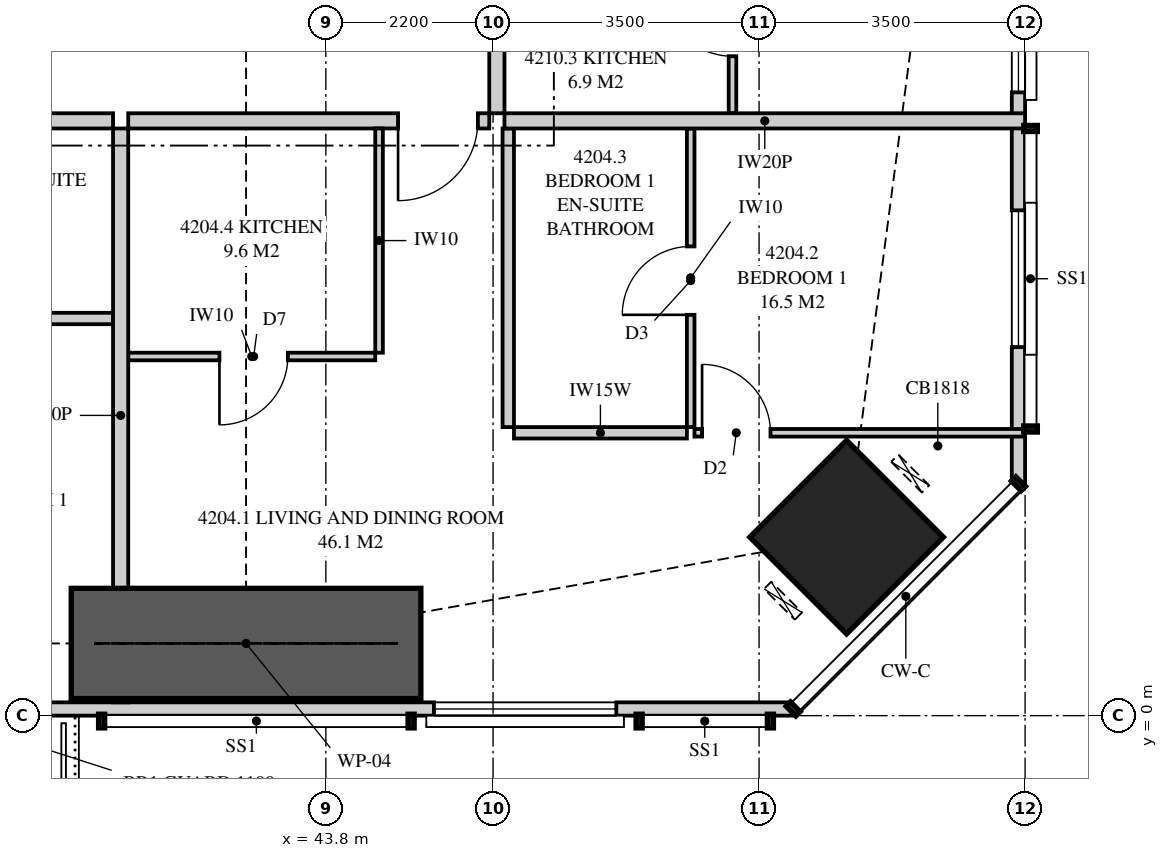
"""IFC4 building model, lengths in metres.
Left out: names, types, materials, properties, quantities, classifications, styles, units other than length and angle.
Written with IfcOpenShell. Run it as: python <this file> out.ifc"""

import sys

from ifc_helpers import new_model, si_unit, direction, frame, frame_2d, origin, origin_2d, place, context, subcontext, project, spatial, polyline, rectangle, hollow_rectangle, outline, extrude, element, fill, save


model = new_model("IFC4")
c1 = context("Model", 3, precision=1e-05, world=origin(), true_north=direction((0.0, 1.0)))
c2 = subcontext(c1, "Body", "Model", "MODEL_VIEW")
j1 = project(units=[si_unit("LENGTHUNIT", "METRE"), si_unit("PLANEANGLEUNIT", "RADIAN")], contexts=[c1])
p1 = place(None, origin())
s1 = spatial("IfcSite", under=j1, at=p1, CompositionType="ELEMENT")
p2 = place(p1, origin())
s2 = spatial("IfcBuilding", under=s1, at=p2, CompositionType="ELEMENT")
p3 = place(p2, frame((0.0, 0.0, 157.7)))
s3 = spatial("IfcBuildingStorey", under=s2, at=p3, CompositionType="ELEMENT", Elevation=157.7)
p4 = place(p3, frame((50.652, 2.348, 0.0), z_axis=(0.0, 0.0, 1.0), x_axis=(-0.707106781187, 0.707106781187, 0.0)))
e1 = element("IfcColumn", 1, at=p4, inside=s3, PredefinedType="COLUMN", context=c2, shape_type="SweptSolid", body=[
    extrude(hollow_rectangle(XDim=1.8, YDim=1.8, WallThickness=0.125, at=origin_2d()), origin(), (0.0, 0.0, 1.0), 3.35),
])
p5 = place(p3, frame((15.051, 0.087, 0.0), z_axis=(0.0, 0.0, 1.0), x_axis=(1.0, 0.0, 0.0)))
e2 = element("IfcWall", 2, at=p5, inside=s3, PredefinedType="SOLIDWALL", context=c2, shape_type="SweptSolid", body=[
    extrude(outline(polyline([(0.0, 0.0), (34.897, 0.0), (34.897, 3.11), (27.91, 3.11), (27.91, 2.15), (27.836, 2.15), (27.836, 3.11), (27.699, 3.11), (27.699, 2.15), (7.199, 2.15), (7.199, 3.11), (7.062, 3.11), (7.062, 2.15), (6.987, 2.15), (6.987, 3.11), (0.0, 3.11), (0.0, 0.0)])), frame((0.0, 0.087, 0.0), z_axis=(0.0, -1.0, 0.0), x_axis=(1.0, 0.0, 0.0)), (0.0, 0.0, 1.0), 0.175),
])
p6 = place(p5, frame((1.625, 0.0, 0.4)))
e3 = element("IfcOpeningElement", 3, at=p6, cuts=e2, PredefinedType="OPENING", context=c2, shape_type="SweptSolid", body=[
    extrude(rectangle(XDim=2.4, YDim=1.7, at=frame_2d((1.2, 0.85))), frame((0.0, 0.097, 0.0), z_axis=(0.0, -1.0, 0.0), x_axis=(1.0, 0.0, 0.0)), (0.0, 0.0, 1.0), 0.195),
])
p7 = place(p5, frame((10.399, 0.0, 0.0)))
e4 = element("IfcOpeningElement", 4, at=p7, cuts=e2, PredefinedType="OPENING", context=c2, shape_type="SweptSolid", body=[
    extrude(rectangle(XDim=1.8, YDim=2.1, at=frame_2d((0.9, 1.05))), frame((0.0, 0.097, 0.0), z_axis=(0.0, -1.0, 0.0), x_axis=(1.0, 0.0, 0.0)), (0.0, 0.0, 1.0), 0.195),
])
p8 = place(p5, frame((13.224, 0.0, 0.4)))
e5 = element("IfcOpeningElement", 5, at=p8, cuts=e2, PredefinedType="OPENING", context=c2, shape_type="SweptSolid", body=[
    extrude(rectangle(XDim=1.8, YDim=1.7, at=frame_2d((0.9, 0.85))), frame((0.0, 0.097, 0.0), z_axis=(0.0, -1.0, 0.0), x_axis=(1.0, 0.0, 0.0)), (0.0, 0.0, 1.0), 0.195),
])
p9 = place(p5, frame((19.849, 0.0, 0.4)))
e6 = element("IfcOpeningElement", 6, at=p9, cuts=e2, PredefinedType="OPENING", context=c2, shape_type="SweptSolid", body=[
    extrude(rectangle(XDim=2.4, YDim=1.7, at=frame_2d((1.2, 0.85))), frame((0.0, 0.097, 0.0), z_axis=(0.0, -1.0, 0.0), x_axis=(1.0, 0.0, 0.0)), (0.0, 0.0, 1.0), 0.195),
])
p10 = place(p5, frame((22.799, 0.0, 0.0)))
e7 = element("IfcOpeningElement", 7, at=p10, cuts=e2, PredefinedType="OPENING", context=c2, shape_type="SweptSolid", body=[
    extrude(rectangle(XDim=1.8, YDim=2.1, at=frame_2d((0.9, 1.05))), frame((0.0, 0.097, 0.0), z_axis=(0.0, -1.0, 0.0), x_axis=(1.0, 0.0, 0.0)), (0.0, 0.0, 1.0), 0.195),
])
p11 = place(p5, frame((30.17, 0.0, 0.4)))
e8 = element("IfcOpeningElement", 8, at=p11, cuts=e2, PredefinedType="OPENING", context=c2, shape_type="SweptSolid", body=[
    extrude(rectangle(XDim=2.4, YDim=1.7, at=frame_2d((1.2, 0.85))), frame((0.0, 0.097, 0.0), z_axis=(0.0, -1.0, 0.0), x_axis=(1.0, 0.0, 0.0)), (0.0, 0.0, 1.0), 0.195),
])
p12 = place(p3, frame((52.913, 3.051, 0.0), z_axis=(0.0, 0.0, 1.0), x_axis=(0.0, 1.0, 0.0)))
e9 = element("IfcWall", 9, at=p12, inside=s3, PredefinedType="SOLIDWALL", context=c2, shape_type="SweptSolid", body=[
    extrude(outline(polyline([(0.0, 0.0), (29.897, 0.0), (29.897, 3.11), (22.167, 3.11), (22.167, 2.15), (22.074, 2.15), (22.074, 3.11), (21.949, 3.11), (21.949, 2.15), (9.949, 2.15), (9.949, 3.11), (9.847, 3.11), (9.847, 2.15), (9.706, 2.15), (9.706, 3.11), (0.0, 3.11), (0.0, 0.0)])), frame((0.0, 0.087, 0.0), z_axis=(0.0, -1.0, 0.0), x_axis=(1.0, 0.0, 0.0)), (0.0, 0.0, 1.0), 0.175),
])
p13 = place(p12, frame((1.797, 0.0, 0.4)))
e10 = element("IfcOpeningElement", 10, at=p13, cuts=e9, PredefinedType="OPENING", context=c2, shape_type="SweptSolid", body=[
    extrude(rectangle(XDim=1.8, YDim=1.7, at=frame_2d((0.9, 0.85))), frame((0.0, 0.097, 0.0), z_axis=(0.0, -1.0, 0.0), x_axis=(1.0, 0.0, 0.0)), (0.0, 0.0, 1.0), 0.195),
])
p14 = place(p12, frame((5.149, 0.0, 0.4)))
e11 = element("IfcOpeningElement", 11, at=p14, cuts=e9, PredefinedType="OPENING", context=c2, shape_type="SweptSolid", body=[
    extrude(rectangle(XDim=2.4, YDim=1.7, at=frame_2d((1.2, 0.85))), frame((0.0, 0.097, 0.0), z_axis=(0.0, -1.0, 0.0), x_axis=(1.0, 0.0, 0.0)), (0.0, 0.0, 1.0), 0.195),
])
p15 = place(p12, frame((15.274, 0.0, 0.0)))
e12 = element("IfcOpeningElement", 12, at=p15, cuts=e9, PredefinedType="OPENING", context=c2, shape_type="SweptSolid", body=[
    extrude(rectangle(XDim=1.8, YDim=2.1, at=frame_2d((0.9, 1.05))), frame((0.0, 0.097, 0.0), z_axis=(0.0, -1.0, 0.0), x_axis=(1.0, 0.0, 0.0)), (0.0, 0.0, 1.0), 0.195),
])
p16 = place(p12, frame((12.349, 0.0, 0.4)))
e13 = element("IfcOpeningElement", 13, at=p16, cuts=e9, PredefinedType="OPENING", context=c2, shape_type="SweptSolid", body=[
    extrude(rectangle(XDim=2.4, YDim=1.7, at=frame_2d((1.2, 0.85))), frame((0.0, 0.097, 0.0), z_axis=(0.0, -1.0, 0.0), x_axis=(1.0, 0.0, 0.0)), (0.0, 0.0, 1.0), 0.195),
])
p17 = place(p12, frame((24.373, 0.0, 0.4)))
e14 = element("IfcOpeningElement", 14, at=p17, cuts=e9, PredefinedType="OPENING", context=c2, shape_type="SweptSolid", body=[
    extrude(rectangle(XDim=1.2, YDim=1.7, at=frame_2d((0.6, 0.85))), frame((0.0, 0.097, 0.0), z_axis=(0.0, -1.0, 0.0), x_axis=(1.0, 0.0, 0.0)), (0.0, 0.0, 1.0), 0.195),
])
p18 = place(p12, frame((26.801, 0.0, 0.4)))
e15 = element("IfcOpeningElement", 15, at=p18, cuts=e9, PredefinedType="OPENING", context=c2, shape_type="SweptSolid", body=[
    extrude(rectangle(XDim=1.8, YDim=1.7, at=frame_2d((0.9, 0.85))), frame((0.0, 0.097, 0.0), z_axis=(0.0, -1.0, 0.0), x_axis=(1.0, 0.0, 0.0)), (0.0, 0.0, 1.0), 0.195),
])
p19 = place(p3, frame((41.1, 0.175, 0.0), z_axis=(0.0, 0.0, 1.0), x_axis=(0.0, 1.0, 0.0)))
e16 = element("IfcWall", 16, at=p19, inside=s3, PredefinedType="PARTITIONING", context=c2, shape_type="SweptSolid", body=[
    extrude(outline(polyline([(0.529, 2.15), (0.0, 2.15), (0.0, 0.0), (0.529, 0.0), (0.529, 0.165), (1.021, 0.165), (1.021, 0.0), (7.55, 0.0), (7.55, 3.11), (1.685, 3.11), (1.685, 2.15), (1.021, 2.15), (1.021, 1.985), (0.529, 1.985), (0.529, 2.15)])), frame((0.0, 0.1, 0.0), z_axis=(0.0, -1.0, 0.0), x_axis=(1.0, 0.0, 0.0)), (0.0, 0.0, 1.0), 0.2),
])
p20 = place(p3, frame((37.55, 5.225, 0.0), z_axis=(0.0, 0.0, 1.0), x_axis=(1.0, 0.0, 0.0)))
e17 = element("IfcWall", 17, at=p20, inside=s3, PredefinedType="PLUMBINGWALL", context=c2, shape_type="SweptSolid", body=[
    extrude(rectangle(XDim=3.45, YDim=0.15, at=frame_2d((1.725, 0.0))), origin(), (0.0, 0.0, 1.0), 3.11),
])
p21 = place(p20, frame((0.4, 0.0, 0.0)))
e18 = element("IfcOpeningElement", 18, at=p21, cuts=e17, PredefinedType="OPENING", context=c2, shape_type="SweptSolid", body=[
    extrude(rectangle(XDim=0.9, YDim=2.1, at=frame_2d((0.45, 1.05))), frame((0.0, 0.085, 0.0), z_axis=(0.0, -1.0, 0.0), x_axis=(1.0, 0.0, 0.0)), (0.0, 0.0, 1.0), 0.17),
])
p22 = place(p3, frame((41.2, 7.825, 0.0), z_axis=(0.0, 0.0, 1.0), x_axis=(1.0, 0.0, 0.0)))
e19 = element("IfcWall", 19, at=p22, inside=s3, PredefinedType="PARTITIONING", context=c2, shape_type="SweptSolid", body=[
    extrude(outline(polyline([(0.0, 0.0), (4.75, 0.0), (4.75, 3.11), (1.896, 3.11), (1.896, 2.531), (1.204, 2.531), (1.204, 3.11), (0.0, 3.11), (0.0, 0.0)])), frame((0.0, 0.1, 0.0), z_axis=(0.0, -1.0, 0.0), x_axis=(1.0, 0.0, 0.0)), (0.0, 0.0, 1.0), 0.2),
])
p23 = place(p22, frame((3.55, 0.0, 0.0)))
e20 = element("IfcOpeningElement", 20, at=p23, cuts=e19, PredefinedType="OPENING", context=c2, shape_type="SweptSolid", body=[
    extrude(rectangle(XDim=1.05, YDim=2.2, at=frame_2d((0.525, 1.1))), frame((0.0, 0.11, 0.0), z_axis=(0.0, -1.0, 0.0), x_axis=(1.0, 0.0, 0.0)), (0.0, 0.0, 1.0), 0.22),
])
p24 = place(p3, frame((48.6, 3.796, 0.0), z_axis=(0.0, 0.0, 1.0), x_axis=(0.0, 1.0, 0.0)))
e21 = element("IfcWall", 21, at=p24, inside=s3, PredefinedType="PARTITIONING", context=c2, shape_type="SweptSolid", body=[
    extrude(rectangle(XDim=3.929, YDim=0.1, at=frame_2d((1.964, 0.0))), origin(), (0.0, 0.0, 1.0), 3.11),
])
p25 = place(p24, frame((1.477, 0.0, 0.0)))
e22 = element("IfcOpeningElement", 22, at=p25, cuts=e21, PredefinedType="OPENING", context=c2, shape_type="SweptSolid", body=[
    extrude(rectangle(XDim=0.9, YDim=2.1, at=frame_2d((0.45, 1.05))), frame((0.0, 0.06, 0.0), z_axis=(0.0, -1.0, 0.0), x_axis=(1.0, 0.0, 0.0)), (0.0, 0.0, 1.0), 0.12),
])
p26 = place(p3, frame((48.65, 3.721, 0.0), z_axis=(0.0, 0.0, 1.0), x_axis=(1.0, 0.0, 0.0)))
e23 = element("IfcWall", 23, at=p26, inside=s3, PredefinedType="PARTITIONING", context=c2, shape_type="SweptSolid", body=[
    extrude(outline(polyline([(0.0, 0.0), (4.35, 0.0), (4.35, 3.11), (3.049, 3.11), (3.049, 2.15), (1.314, 2.15), (1.314, 3.11), (0.0, 3.11), (0.0, 0.0)])), frame((0.0, 0.05, 0.0), z_axis=(0.0, -1.0, 0.0), x_axis=(1.0, 0.0, 0.0)), (0.0, 0.0, 1.0), 0.1),
])
p27 = place(p26, frame((0.1, 0.0, 0.0)))
e24 = element("IfcOpeningElement", 24, at=p27, cuts=e23, PredefinedType="OPENING", context=c2, shape_type="SweptSolid", body=[
    extrude(rectangle(XDim=0.9, YDim=2.1, at=frame_2d((0.45, 1.05))), frame((0.0, 0.06, 0.0), z_axis=(0.0, -1.0, 0.0), x_axis=(1.0, 0.0, 0.0)), (0.0, 0.0, 1.0), 0.12),
])
p28 = place(p3, frame((46.275, 3.721, 0.0), z_axis=(0.0, 0.0, 1.0), x_axis=(1.0, 0.0, 0.0)))
e25 = element("IfcWall", 25, at=p28, inside=s3, PredefinedType="PLUMBINGWALL", context=c2, shape_type="SweptSolid", body=[
    extrude(rectangle(XDim=2.275, YDim=0.15, at=frame_2d((1.138, 0.0))), origin(), (0.0, 0.0, 1.0), 3.11),
])
p29 = place(p3, frame((46.2, 3.796, 0.0), z_axis=(0.0, 0.0, 1.0), x_axis=(0.0, 1.0, 0.0)))
e26 = element("IfcWall", 26, at=p29, inside=s3, PredefinedType="PLUMBINGWALL", context=c2, shape_type="SweptSolid", body=[
    extrude(rectangle(XDim=3.929, YDim=0.15, at=frame_2d((1.964, 0.0))), origin(), (0.0, 0.0, 1.0), 3.11),
])
p30 = place(p3, frame((41.2, 4.725, 0.0), z_axis=(0.0, 0.0, 1.0), x_axis=(1.0, 0.0, 0.0)))
e27 = element("IfcWall", 27, at=p30, inside=s3, PredefinedType="PARTITIONING", context=c2, shape_type="SweptSolid", body=[
    extrude(outline(polyline([(0.0, 0.0), (3.25, 0.0), (3.25, 3.11), (1.846, 3.11), (1.846, 2.531), (1.254, 2.531), (1.254, 3.11), (0.0, 3.11), (0.0, 0.0)])), frame((0.0, 0.05, 0.0), z_axis=(0.0, -1.0, 0.0), x_axis=(1.0, 0.0, 0.0)), (0.0, 0.0, 1.0), 0.1),
])
p31 = place(p30, frame((1.2, 0.0, 0.0)))
e28 = element("IfcOpeningElement", 28, at=p31, cuts=e27, PredefinedType="OPENING", context=c2, shape_type="SweptSolid", body=[
    extrude(rectangle(XDim=0.9, YDim=2.1, at=frame_2d((0.45, 1.05))), frame((0.0, 0.06, 0.0), z_axis=(0.0, -1.0, 0.0), x_axis=(1.0, 0.0, 0.0)), (0.0, 0.0, 1.0), 0.12),
])
p32 = place(p3, frame((44.5, 4.775, 0.0), z_axis=(0.0, 0.0, 1.0), x_axis=(0.0, 1.0, 0.0)))
e29 = element("IfcWall", 29, at=p32, inside=s3, PredefinedType="PARTITIONING", context=c2, shape_type="SweptSolid", body=[
    extrude(rectangle(XDim=2.95, YDim=0.1, at=frame_2d((1.475, 0.0))), origin(), (0.0, 0.0, 1.0), 3.11),
])
p33 = place(p3, frame((46.15, 7.825, 0.0), z_axis=(0.0, 0.0, 1.0), x_axis=(1.0, 0.0, 0.0)))
e30 = element("IfcWall", 30, at=p33, inside=s3, PredefinedType="PARTITIONING", context=c2, shape_type="SweptSolid", body=[
    extrude(outline(polyline([(0.0, 0.0), (6.85, 0.0), (6.85, 3.11), (6.138, 3.11), (6.138, 2.15), (4.303, 2.15), (4.303, 3.11), (0.0, 3.11), (0.0, 0.0)])), frame((0.0, 0.1, 0.0), z_axis=(0.0, -1.0, 0.0), x_axis=(1.0, 0.0, 0.0)), (0.0, 0.0, 1.0), 0.2),
])
p34 = place(p3, frame((46.05, 7.925, 0.0), z_axis=(0.0, 0.0, 1.0), x_axis=(0.0, 1.0, 0.0)))
e31 = element("IfcWall", 31, at=p34, inside=s3, PredefinedType="PARTITIONING", context=c2, shape_type="SweptSolid", body=[
    extrude(outline(polyline([(0.0, 0.0), (6.475, 0.0), (6.475, 3.11), (5.421, 3.11), (5.421, 2.531), (4.729, 2.531), (4.729, 3.11), (0.0, 3.11), (0.0, 0.0)])), frame((0.0, 0.1, 0.0), z_axis=(0.0, -1.0, 0.0), x_axis=(1.0, 0.0, 0.0)), (0.0, 0.0, 1.0), 0.2),
])
p35 = place(p34, frame((2.738, 0.0, 0.0)))
e32 = element("IfcOpeningElement", 32, at=p35, cuts=e31, PredefinedType="OPENING", context=c2, shape_type="SweptSolid", body=[
    extrude(rectangle(XDim=1.05, YDim=2.2, at=frame_2d((0.525, 1.1))), frame((0.0, 0.11, 0.0), z_axis=(0.0, -1.0, 0.0), x_axis=(1.0, 0.0, 0.0)), (0.0, 0.0, 1.0), 0.22),
])
p36 = place(p3, frame((49.15, 7.925, 0.0), z_axis=(0.0, 0.0, 1.0), x_axis=(0.0, 1.0, 0.0)))
e33 = element("IfcWall", 33, at=p36, inside=s3, PredefinedType="PARTITIONING", context=c2, shape_type="SweptSolid", body=[
    extrude(rectangle(XDim=2.35, YDim=0.1, at=frame_2d((1.175, 0.0))), origin(), (0.0, 0.0, 1.0), 3.11),
])
p37 = place(p36, frame((0.75, 0.0, 0.0)))
e34 = element("IfcOpeningElement", 34, at=p37, cuts=e33, PredefinedType="OPENING", context=c2, shape_type="SweptSolid", body=[
    extrude(rectangle(XDim=0.9, YDim=2.1, at=frame_2d((0.45, 1.05))), frame((0.0, 0.06, 0.0), z_axis=(0.0, -1.0, 0.0), x_axis=(1.0, 0.0, 0.0)), (0.0, 0.0, 1.0), 0.12),
])
p38 = place(p3, frame((37.25, 7.825, 0.0), z_axis=(0.0, 0.0, 1.0), x_axis=(1.0, 0.0, 0.0)))
e35 = element("IfcWall", 35, at=p38, inside=s3, PredefinedType="PARTITIONING", context=c2, shape_type="SweptSolid", body=[
    extrude(rectangle(XDim=3.75, YDim=0.2, at=frame_2d((1.875, 0.0))), origin(), (0.0, 0.0, 1.0), 3.11),
])
p39 = place(p3, frame((40.45, 0.95, 0.0), z_axis=(0.0, 0.0, 1.0), x_axis=(1.0, 0.0, 0.0)))
e36 = element("IfcWall", 36, at=p39, inside=s3, PredefinedType="SHEAR", context=c2, shape_type="SweptSolid", body=[
    extrude(rectangle(XDim=4.6, YDim=1.45, at=frame_2d((2.3, 0.0))), origin(), (0.0, 0.0, 1.0), 3.35),
])
p40 = place(p11, origin())
e37 = element("IfcWindow", 37, at=p40, inside=s3, PartitioningType="SINGLE_PANEL", PredefinedType="WINDOW", context=c2, shape_type="SweptSolid", body=[
    extrude(rectangle(XDim=2.4, YDim=1.7, at=frame_2d((1.2, 0.85))), frame((0.0, 0.03, 0.0), z_axis=(0.0, -1.0, 0.0), x_axis=(1.0, 0.0, 0.0)), (0.0, 0.0, 1.0), 0.06),
])
fill(e8, e37)
p41 = place(p13, origin())
e38 = element("IfcWindow", 38, at=p41, inside=s3, PartitioningType="SINGLE_PANEL", PredefinedType="WINDOW", context=c2, shape_type="SweptSolid", body=[
    extrude(rectangle(XDim=1.8, YDim=1.7, at=frame_2d((0.9, 0.85))), frame((0.0, 0.03, 0.0), z_axis=(0.0, -1.0, 0.0), x_axis=(1.0, 0.0, 0.0)), (0.0, 0.0, 1.0), 0.06),
])
fill(e10, e38)
p42 = place(p14, origin())
e39 = element("IfcWindow", 39, at=p42, inside=s3, PartitioningType="SINGLE_PANEL", PredefinedType="WINDOW", context=c2, shape_type="SweptSolid", body=[
    extrude(rectangle(XDim=2.4, YDim=1.7, at=frame_2d((1.2, 0.85))), frame((0.0, 0.03, 0.0), z_axis=(0.0, -1.0, 0.0), x_axis=(1.0, 0.0, 0.0)), (0.0, 0.0, 1.0), 0.06),
])
fill(e11, e39)
p43 = place(p23, frame((1.05, 0.0, 0.0), z_axis=(0.0, 0.0, 1.0), x_axis=(-1.0, 0.0, 0.0)))
e40 = element("IfcDoor", 40, at=p43, inside=s3, OperationType="SINGLE_SWING_RIGHT", PredefinedType="DOOR", context=c2, shape_type="SweptSolid", body=[
    extrude(rectangle(XDim=1.05, YDim=2.2, at=frame_2d((0.525, 1.1))), frame((0.0, 0.025, 0.0), z_axis=(0.0, -1.0, 0.0), x_axis=(1.0, 0.0, 0.0)), (0.0, 0.0, 1.0), 0.05),
])
fill(e20, e40)
p44 = place(p27, origin())
e41 = element("IfcDoor", 41, at=p44, inside=s3, OperationType="SINGLE_SWING_LEFT", PredefinedType="DOOR", context=c2, shape_type="SweptSolid", body=[
    extrude(rectangle(XDim=0.9, YDim=2.1, at=frame_2d((0.45, 1.05))), frame((0.0, 0.025, 0.0), z_axis=(0.0, -1.0, 0.0), x_axis=(1.0, 0.0, 0.0)), (0.0, 0.0, 1.0), 0.05),
])
fill(e24, e41)
p45 = place(p25, origin())
e42 = element("IfcDoor", 42, at=p45, inside=s3, OperationType="SINGLE_SWING_LEFT", PredefinedType="DOOR", context=c2, shape_type="SweptSolid", body=[
    extrude(rectangle(XDim=0.9, YDim=2.1, at=frame_2d((0.45, 1.05))), frame((0.0, 0.025, 0.0), z_axis=(0.0, -1.0, 0.0), x_axis=(1.0, 0.0, 0.0)), (0.0, 0.0, 1.0), 0.05),
])
fill(e22, e42)
p46 = place(p31, frame((0.9, 0.0, 0.0), z_axis=(0.0, 0.0, 1.0), x_axis=(-1.0, 0.0, 0.0)))
e43 = element("IfcDoor", 43, at=p46, inside=s3, OperationType="SINGLE_SWING_RIGHT", PredefinedType="DOOR", context=c2, shape_type="SweptSolid", body=[
    extrude(rectangle(XDim=0.9, YDim=2.1, at=frame_2d((0.45, 1.05))), frame((0.0, 0.025, 0.0), z_axis=(0.0, -1.0, 0.0), x_axis=(1.0, 0.0, 0.0)), (0.0, 0.0, 1.0), 0.05),
])
fill(e28, e43)
p47 = place(p37, origin())
e44 = element("IfcDoor", 44, at=p47, inside=s3, OperationType="SINGLE_SWING_RIGHT", PredefinedType="DOOR", context=c2, shape_type="SweptSolid", body=[
    extrude(rectangle(XDim=0.9, YDim=2.1, at=frame_2d((0.45, 1.05))), frame((0.0, 0.025, 0.0), z_axis=(0.0, -1.0, 0.0), x_axis=(1.0, 0.0, 0.0)), (0.0, 0.0, 1.0), 0.05),
])
fill(e34, e44)
save(model, sys.argv[1])
